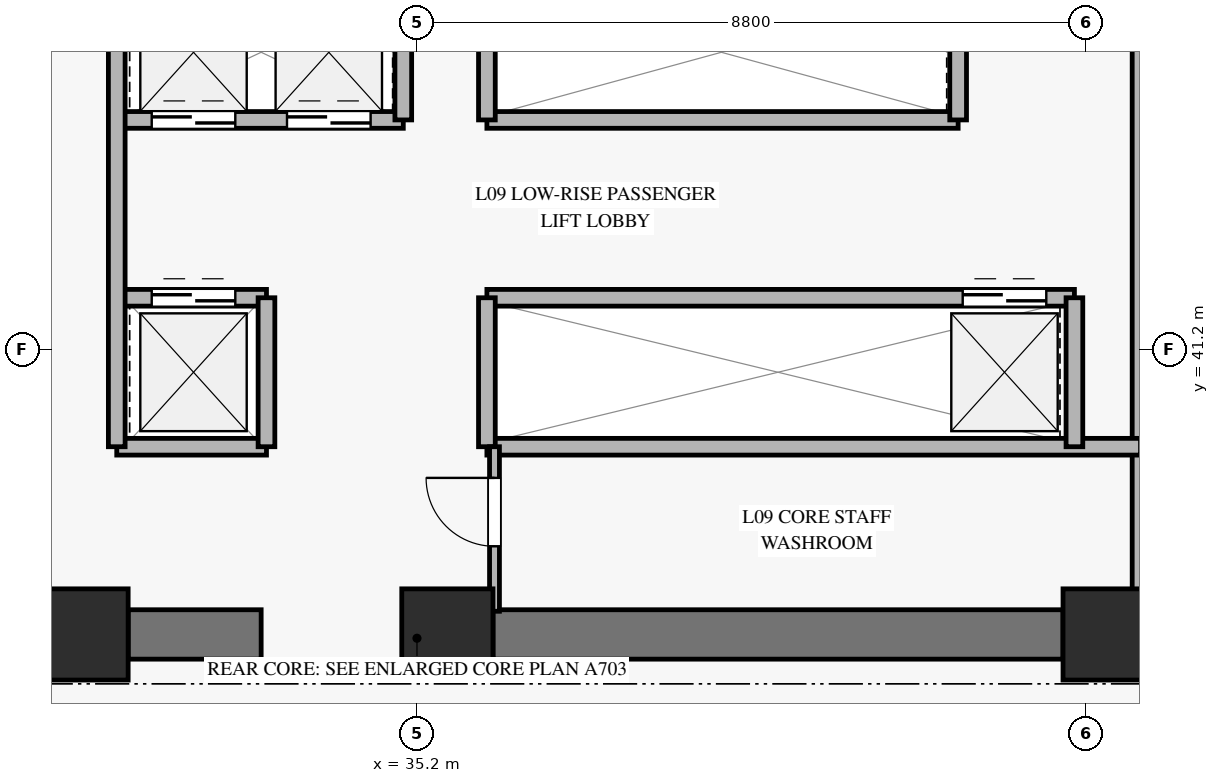
"""IFC4 building model, lengths in metres.
Left out: names, types, materials, properties, quantities, classifications, styles, units other than length and angle.
Written with IfcOpenShell. Run it as: python <this file> out.ifc"""

import sys

from ifc_helpers import new_model, si_unit, direction, frame, frame_2d, origin, origin_2d, place, context, subcontext, project, spatial, rectangle, extrude, source, transform, mapped, element, fill, save


model = new_model("IFC4")
c1 = context("Model", 3, precision=1e-05, world=origin(), true_north=direction((0.0, 1.0)))
c2 = subcontext(c1, "Body", "Model", "MODEL_VIEW")
j1 = project(units=[si_unit("LENGTHUNIT", "METRE"), si_unit("PLANEANGLEUNIT", "RADIAN")], contexts=[c1])
p1 = place(None, origin())
s1 = spatial("IfcSite", under=j1, at=p1, CompositionType="ELEMENT")
p2 = place(p1, origin())
s2 = spatial("IfcBuilding", under=s1, at=p2, CompositionType="ELEMENT")
p3 = place(p2, frame((0.0, 0.0, 37.1)))
s3 = spatial("IfcBuildingStorey", under=s2, at=p3, CompositionType="ELEMENT", Elevation=37.1)
m1 = source(origin(), c2, "Body", "SweptSolid", [
    extrude(rectangle(XDim=1.2, YDim=1.2, at=origin_2d()), origin(), (0.0, 0.0, 1.0), 3.68),
])
for number, where, z_axis, x_axis in (
    (1, (30.8, 37.45, 0.0), (0.0, 0.0, 1.0), (1.0, 0.0, 0.0)),
    (2, (35.6, 37.45, 0.0), (0.0, 0.0, 1.0), (1.0, 0.0, 0.0)),
    (3, (44.3, 37.45, 0.0), (0.0, 0.0, 1.0), (1.0, 0.0, 0.0)),
):
    element("IfcColumn", number, at=place(p3, frame(where, z_axis=z_axis, x_axis=x_axis)), inside=s3, PredefinedType="PILASTER", context=c2, shape_type="MappedRepresentation", body=[
        mapped(m1, transform((0.0, 0.0, 0.0), x_axis=(1.0, 0.0, 0.0), y_axis=(0.0, 1.0, 0.0), z_axis=(0.0, 0.0, 1.0), scale=1.0)),
    ])
p4 = place(p3, frame((31.4, 37.45, 0.0), z_axis=(0.0, 0.0, 1.0), x_axis=(1.0, 0.0, 0.0)))
e4 = element("IfcWall", 4, at=p4, inside=s3, PredefinedType="SHEAR", context=c2, shape_type="SweptSolid", body=[
    extrude(rectangle(XDim=1.75, YDim=0.65, at=frame_2d((0.875, 0.0))), origin(), (0.0, 0.0, 1.0), 3.68),
])
p5 = place(p3, frame((36.2, 37.45, 0.0), z_axis=(0.0, 0.0, 1.0), x_axis=(1.0, 0.0, 0.0)))
e5 = element("IfcWall", 5, at=p5, inside=s3, PredefinedType="SHEAR", context=c2, shape_type="SweptSolid", body=[
    extrude(rectangle(XDim=7.5, YDim=0.65, at=frame_2d((3.75, 0.0))), origin(), (0.0, 0.0, 1.0), 3.68),
])
p6 = place(p3, frame((44.72, 37.755, 0.0), z_axis=(0.0, 0.0, 1.0), x_axis=(0.0, 1.0, 0.0)))
e6 = element("IfcWall", 6, at=p6, inside=s3, PredefinedType="SOLIDWALL", context=c2, shape_type="SweptSolid", body=[
    extrude(rectangle(XDim=7.465, YDim=0.22, at=frame_2d((3.732, 0.0))), origin(), (0.0, 0.0, 1.0), 3.68),
])
p7 = place(p3, frame((31.25, 44.22, 0.0), z_axis=(0.0, 0.0, 1.0), x_axis=(1.0, 0.0, 0.0)))
e7 = element("IfcWall", 7, at=p7, inside=s3, PredefinedType="SOLIDWALL", context=c2, shape_type="SweptSolid", body=[
    extrude(rectangle(XDim=3.77, YDim=0.22, at=frame_2d((1.885, 0.0))), origin(), (0.0, 0.0, 1.0), 3.68),
])
p8 = place(p7, frame((0.46, 0.0, 0.0)))
e8 = element("IfcOpeningElement", 8, at=p8, cuts=e7, PredefinedType="OPENING", context=c2, shape_type="SweptSolid", body=[
    extrude(rectangle(XDim=1.1, YDim=2.2, at=frame_2d((0.55, 1.1))), frame((0.0, 0.12, 0.0), z_axis=(0.0, -1.0, 0.0), x_axis=(1.0, 0.0, 0.0)), (0.0, 0.0, 1.0), 0.24),
])
p9 = place(p7, frame((2.24, 0.0, 0.0)))
e9 = element("IfcOpeningElement", 9, at=p9, cuts=e7, PredefinedType="OPENING", context=c2, shape_type="SweptSolid", body=[
    extrude(rectangle(XDim=1.1, YDim=2.2, at=frame_2d((0.55, 1.1))), frame((0.0, 0.12, 0.0), z_axis=(0.0, -1.0, 0.0), x_axis=(1.0, 0.0, 0.0)), (0.0, 0.0, 1.0), 0.24),
])
p10 = place(p3, frame((36.12, 44.22, 0.0), z_axis=(0.0, 0.0, 1.0), x_axis=(1.0, 0.0, 0.0)))
e10 = element("IfcWall", 10, at=p10, inside=s3, PredefinedType="SOLIDWALL", context=c2, shape_type="SweptSolid", body=[
    extrude(rectangle(XDim=6.2, YDim=0.22, at=frame_2d((3.1, 0.0))), origin(), (0.0, 0.0, 1.0), 3.68),
])
for number, where, z_axis, x_axis in (
    (11, (35.02, 44.22, 0.0), (0.0, 0.0, 1.0), (0.0, 1.0, 0.0)),
    (12, (36.12, 44.22, 0.0), (0.0, 0.0, 1.0), (0.0, 1.0, 0.0)),
    (13, (42.32, 44.22, 0.0), (0.0, 0.0, 1.0), (0.0, 1.0, 0.0)),
):
    element("IfcWall", number, at=place(p3, frame(where, z_axis=z_axis, x_axis=x_axis)), inside=s3, PredefinedType="SOLIDWALL", context=c2, shape_type="SweptSolid", body=[
        extrude(rectangle(XDim=2.025, YDim=0.22, at=frame_2d((1.013, 0.0))), origin(), (0.0, 0.0, 1.0), 3.68),
    ])
p11 = place(p3, frame((31.25, 41.88, 0.0), z_axis=(0.0, 0.0, 1.0), x_axis=(1.0, 0.0, 0.0)))
e14 = element("IfcWall", 14, at=p11, inside=s3, PredefinedType="SOLIDWALL", context=c2, shape_type="SweptSolid", body=[
    extrude(rectangle(XDim=1.97, YDim=0.22, at=frame_2d((0.985, 0.0))), origin(), (0.0, 0.0, 1.0), 3.68),
])
p12 = place(p11, frame((0.46, 0.0, 0.0)))
e15 = element("IfcOpeningElement", 15, at=p12, cuts=e14, PredefinedType="OPENING", context=c2, shape_type="SweptSolid", body=[
    extrude(rectangle(XDim=1.1, YDim=2.2, at=frame_2d((0.55, 1.1))), frame((0.0, 0.12, 0.0), z_axis=(0.0, -1.0, 0.0), x_axis=(1.0, 0.0, 0.0)), (0.0, 0.0, 1.0), 0.24),
])
p13 = place(p3, frame((36.12, 41.88, 0.0), z_axis=(0.0, 0.0, 1.0), x_axis=(1.0, 0.0, 0.0)))
e16 = element("IfcWall", 16, at=p13, inside=s3, PredefinedType="SOLIDWALL", context=c2, shape_type="SweptSolid", body=[
    extrude(rectangle(XDim=7.73, YDim=0.22, at=frame_2d((3.865, 0.0))), origin(), (0.0, 0.0, 1.0), 3.68),
])
p14 = place(p13, frame((6.26, 0.0, 0.0)))
e17 = element("IfcOpeningElement", 17, at=p14, cuts=e16, PredefinedType="OPENING", context=c2, shape_type="SweptSolid", body=[
    extrude(rectangle(XDim=1.1, YDim=2.2, at=frame_2d((0.55, 1.1))), frame((0.0, 0.12, 0.0), z_axis=(0.0, -1.0, 0.0), x_axis=(1.0, 0.0, 0.0)), (0.0, 0.0, 1.0), 0.24),
])
p15 = place(p3, frame((31.25, 39.92, 0.0), z_axis=(0.0, 0.0, 1.0), x_axis=(1.0, 0.0, 0.0)))
e18 = element("IfcWall", 18, at=p15, inside=s3, PredefinedType="SOLIDWALL", context=c2, shape_type="SweptSolid", body=[
    extrude(rectangle(XDim=1.97, YDim=0.22, at=frame_2d((0.985, 0.0))), origin(), (0.0, 0.0, 1.0), 3.68),
])
p16 = place(p3, frame((33.22, 39.92, 0.0), z_axis=(0.0, 0.0, 1.0), x_axis=(0.0, 1.0, 0.0)))
e19 = element("IfcWall", 19, at=p16, inside=s3, PredefinedType="SOLIDWALL", context=c2, shape_type="SweptSolid", body=[
    extrude(rectangle(XDim=1.96, YDim=0.22, at=frame_2d((0.98, 0.0))), origin(), (0.0, 0.0, 1.0), 3.68),
])
p17 = place(p3, frame((36.12, 39.92, 0.0), z_axis=(0.0, 0.0, 1.0), x_axis=(1.0, 0.0, 0.0)))
e20 = element("IfcWall", 20, at=p17, inside=s3, PredefinedType="SOLIDWALL", context=c2, shape_type="SweptSolid", body=[
    extrude(rectangle(XDim=8.6, YDim=0.22, at=frame_2d((4.3, 0.0))), origin(), (0.0, 0.0, 1.0), 2.965),
])
p18 = place(p3, frame((36.12, 39.92, 0.0), z_axis=(0.0, 0.0, 1.0), x_axis=(0.0, 1.0, 0.0)))
e21 = element("IfcWall", 21, at=p18, inside=s3, PredefinedType="SOLIDWALL", context=c2, shape_type="SweptSolid", body=[
    extrude(rectangle(XDim=1.96, YDim=0.22, at=frame_2d((0.98, 0.0))), origin(), (0.0, 0.0, 1.0), 3.68),
])
p19 = place(p3, frame((31.25, 39.92, 0.0), z_axis=(0.0, 0.0, 1.0), x_axis=(0.0, 1.0, 0.0)))
e22 = element("IfcWall", 22, at=p19, inside=s3, PredefinedType="SOLIDWALL", context=c2, shape_type="SweptSolid", body=[
    extrude(rectangle(XDim=6.325, YDim=0.22, at=frame_2d((3.163, 0.0))), origin(), (0.0, 0.0, 1.0), 3.68),
])
p20 = place(p3, frame((43.85, 39.92, 0.0), z_axis=(0.0, 0.0, 1.0), x_axis=(0.0, 1.0, 0.0)))
e23 = element("IfcWall", 23, at=p20, inside=s3, PredefinedType="SOLIDWALL", context=c2, shape_type="SweptSolid", body=[
    extrude(rectangle(XDim=1.96, YDim=0.22, at=frame_2d((0.98, 0.0))), origin(), (0.0, 0.0, 1.0), 3.68),
])
p21 = place(p3, frame((36.22, 37.755, 0.0), z_axis=(0.0, 0.0, 1.0), x_axis=(0.0, 1.0, 0.0)))
e24 = element("IfcWall", 24, at=p21, inside=s3, PredefinedType="PARTITIONING", context=c2, shape_type="SweptSolid", body=[
    extrude(rectangle(XDim=2.165, YDim=0.13, at=frame_2d((1.083, 0.0))), origin(), (0.0, 0.0, 1.0), 3.68),
])
p22 = place(p21, frame((0.855, 0.0, 0.0)))
e25 = element("IfcOpeningElement", 25, at=p22, cuts=e24, PredefinedType="OPENING", context=c2, shape_type="SweptSolid", body=[
    extrude(rectangle(XDim=0.9, YDim=2.1, at=frame_2d((0.45, 1.05))), frame((0.0, 0.075, 0.0), z_axis=(0.0, -1.0, 0.0), x_axis=(1.0, 0.0, 0.0)), (0.0, 0.0, 1.0), 0.15),
])
m2 = source(origin(), c2, "Body", "SweptSolid", [
    extrude(rectangle(XDim=1.1, YDim=2.2, at=frame_2d((0.55, 1.1))), frame((0.0, 0.025, 0.0), z_axis=(0.0, -1.0, 0.0), x_axis=(1.0, 0.0, 0.0)), (0.0, 0.0, 1.0), 0.05),
])
p23 = place(p8, origin())
e26 = element("IfcDoor", 26, at=p23, inside=s3, OperationType="SLIDING_TO_LEFT", PredefinedType="DOOR", context=c2, shape_type="MappedRepresentation", body=[
    mapped(m2, transform((0.0, 0.0, 0.0), x_axis=(1.0, 0.0, 0.0), y_axis=(0.0, 1.0, 0.0), z_axis=(0.0, 0.0, 1.0), scale=1.0)),
])
fill(e8, e26)
p24 = place(p9, origin())
e27 = element("IfcDoor", 27, at=p24, inside=s3, OperationType="SLIDING_TO_LEFT", PredefinedType="DOOR", context=c2, shape_type="MappedRepresentation", body=[
    mapped(m2, transform((0.0, 0.0, 0.0), x_axis=(1.0, 0.0, 0.0), y_axis=(0.0, 1.0, 0.0), z_axis=(0.0, 0.0, 1.0), scale=1.0)),
])
fill(e9, e27)
p25 = place(p12, origin())
e28 = element("IfcDoor", 28, at=p25, inside=s3, OperationType="SLIDING_TO_LEFT", PredefinedType="DOOR", context=c2, shape_type="MappedRepresentation", body=[
    mapped(m2, transform((0.0, 0.0, 0.0), x_axis=(1.0, 0.0, 0.0), y_axis=(0.0, 1.0, 0.0), z_axis=(0.0, 0.0, 1.0), scale=1.0)),
])
fill(e15, e28)
p26 = place(p14, origin())
e29 = element("IfcDoor", 29, at=p26, inside=s3, OperationType="SLIDING_TO_LEFT", PredefinedType="DOOR", context=c2, shape_type="MappedRepresentation", body=[
    mapped(m2, transform((0.0, 0.0, 0.0), x_axis=(1.0, 0.0, 0.0), y_axis=(0.0, 1.0, 0.0), z_axis=(0.0, 0.0, 1.0), scale=1.0)),
])
fill(e17, e29)
m3 = source(origin(), c2, "Body", "SweptSolid", [
    extrude(rectangle(XDim=0.9, YDim=2.1, at=frame_2d((0.45, 1.05))), frame((0.0, 0.025, 0.0), z_axis=(0.0, -1.0, 0.0), x_axis=(1.0, 0.0, 0.0)), (0.0, 0.0, 1.0), 0.05),
])
p27 = place(p22, origin())
e30 = element("IfcDoor", 30, at=p27, inside=s3, OperationType="SINGLE_SWING_RIGHT", PredefinedType="DOOR", context=c2, shape_type="MappedRepresentation", body=[
    mapped(m3, transform((0.0, 0.0, 0.0), x_axis=(1.0, 0.0, 0.0), y_axis=(0.0, 1.0, 0.0), z_axis=(0.0, 0.0, 1.0), scale=1.0)),
])
fill(e25, e30)
save(model, sys.argv[1])
